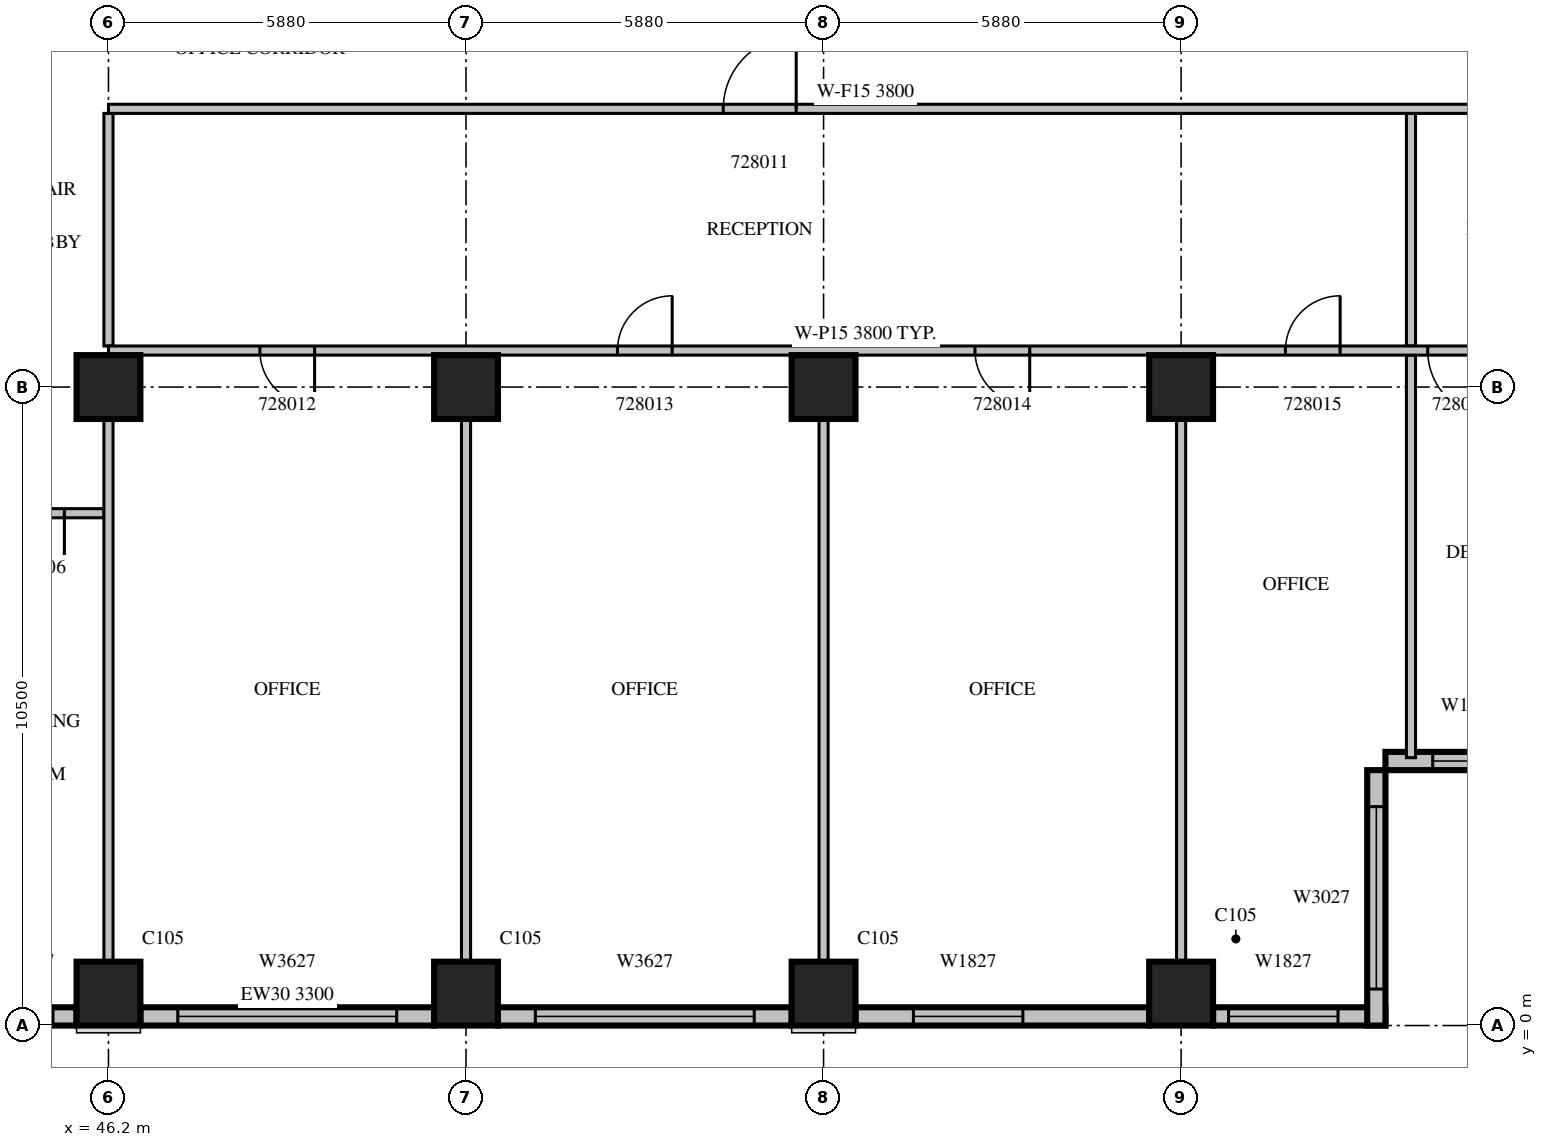
"""IFC4 building model, lengths in metres.
Left out: names, types, materials, properties, quantities, classifications, styles, units other than length and angle.
Written with IfcOpenShell. Run it as: python <this file> out.ifc"""

import sys

from ifc_helpers import new_model, si_unit, direction, frame, frame_2d, origin, origin_2d, place, context, subcontext, project, spatial, rectangle, extrude, source, transform, mapped, element, fill, save


model = new_model("IFC4")
c1 = context("Model", 3, precision=1e-05, world=origin(), true_north=direction((0.0, 1.0)))
c2 = subcontext(c1, "Body", "Model", "MODEL_VIEW")
j1 = project(units=[si_unit("LENGTHUNIT", "METRE"), si_unit("PLANEANGLEUNIT", "RADIAN")], contexts=[c1])
p1 = place(None, origin())
s1 = spatial("IfcSite", under=j1, at=p1, CompositionType="ELEMENT")
p2 = place(p1, origin())
s2 = spatial("IfcBuilding", under=s1, at=p2, CompositionType="ELEMENT")
p3 = place(p2, frame((0.0, 0.0, 128.7)))
s3 = spatial("IfcBuildingStorey", under=s2, at=p3, CompositionType="ELEMENT", Elevation=128.7)
m1 = source(origin(), c2, "Body", "SweptSolid", [
    extrude(rectangle(XDim=1.05, YDim=1.05, at=origin_2d()), origin(), (0.0, 0.0, 1.0), 4.2),
])
for number, where, z_axis, x_axis in (
    (1, (46.2, 0.525, 0.0), (0.0, 0.0, 1.0), (1.0, 0.0, 0.0)),
    (2, (52.08, 0.525, 0.0), (0.0, 0.0, 1.0), (1.0, 0.0, 0.0)),
    (3, (57.96, 0.525, 0.0), (0.0, 0.0, 1.0), (1.0, 0.0, 0.0)),
    (4, (63.84, 0.525, 0.0), (0.0, 0.0, 1.0), (1.0, 0.0, 0.0)),
    (5, (46.2, 10.5, 0.0), (0.0, 0.0, 1.0), (1.0, 0.0, 0.0)),
    (6, (52.08, 10.5, 0.0), (0.0, 0.0, 1.0), (1.0, 0.0, 0.0)),
    (7, (57.96, 10.5, 0.0), (0.0, 0.0, 1.0), (1.0, 0.0, 0.0)),
    (8, (63.84, 10.5, 0.0), (0.0, 0.0, 1.0), (1.0, 0.0, 0.0)),
):
    element("IfcColumn", number, at=place(p3, frame(where, z_axis=z_axis, x_axis=x_axis)), inside=s3, PredefinedType="COLUMN", context=c2, shape_type="MappedRepresentation", body=[
        mapped(m1, transform((0.0, 0.0, 0.0), scale=1.0)),
    ])
m2 = source(origin(), c2, "Body", "SweptSolid", [
    extrude(rectangle(XDim=1.675, YDim=0.3, at=frame_2d((0.838, 0.0))), origin(), (0.0, 0.0, 1.0), 3.8),
])
p4 = place(p3, frame((44.0, 0.15, 0.0), z_axis=(0.0, 0.0, 1.0), x_axis=(1.0, 0.0, 0.0)))
e9 = element("IfcWall", 9, at=p4, inside=s3, PredefinedType="STANDARD", context=c2, shape_type="MappedRepresentation", body=[
    mapped(m2, transform((0.0, 0.0, 0.0), scale=1.0)),
])
m3 = source(origin(), c2, "Body", "SweptSolid", [
    extrude(rectangle(XDim=0.9, YDim=2.7, at=frame_2d((0.45, 1.35))), frame((0.0, 0.16, 0.0), z_axis=(0.0, -1.0, 0.0), x_axis=(1.0, 0.0, 0.0)), (0.0, 0.0, 1.0), 0.32),
])
p5 = place(p4, frame((0.388, 0.0, 0.6)))
e10 = element("IfcOpeningElement", 10, at=p5, cuts=e9, PredefinedType="OPENING", context=c2, shape_type="MappedRepresentation", body=[
    mapped(m3, transform((0.0, 0.0, 0.0), scale=1.0)),
])
m4 = source(origin(), c2, "Body", "SweptSolid", [
    extrude(rectangle(XDim=4.83, YDim=0.3, at=frame_2d((2.415, 0.0))), origin(), (0.0, 0.0, 1.0), 3.3),
])
p6 = place(p3, frame((46.725, 0.15, 0.0), z_axis=(0.0, 0.0, 1.0), x_axis=(1.0, 0.0, 0.0)))
e11 = element("IfcWall", 11, at=p6, inside=s3, PredefinedType="STANDARD", context=c2, shape_type="MappedRepresentation", body=[
    mapped(m4, transform((0.0, 0.0, 0.0), scale=1.0)),
])
m5 = source(origin(), c2, "Body", "SweptSolid", [
    extrude(rectangle(XDim=3.6, YDim=2.7, at=frame_2d((1.8, 1.35))), frame((0.0, 0.16, 0.0), z_axis=(0.0, -1.0, 0.0), x_axis=(1.0, 0.0, 0.0)), (0.0, 0.0, 1.0), 0.32),
])
p7 = place(p6, frame((0.615, 0.0, 0.6)))
e12 = element("IfcOpeningElement", 12, at=p7, cuts=e11, PredefinedType="OPENING", context=c2, shape_type="MappedRepresentation", body=[
    mapped(m5, transform((0.0, 0.0, 0.0), scale=1.0)),
])
m6 = source(origin(), c2, "Body", "SweptSolid", [
    extrude(rectangle(XDim=4.83, YDim=0.3, at=frame_2d((2.415, 0.0))), origin(), (0.0, 0.0, 1.0), 3.8),
])
p8 = place(p3, frame((52.605, 0.15, 0.0), z_axis=(0.0, 0.0, 1.0), x_axis=(1.0, 0.0, 0.0)))
e13 = element("IfcWall", 13, at=p8, inside=s3, PredefinedType="STANDARD", context=c2, shape_type="MappedRepresentation", body=[
    mapped(m6, transform((0.0, 0.0, 0.0), scale=1.0)),
])
p9 = place(p8, frame((0.615, 0.0, 0.6)))
e14 = element("IfcOpeningElement", 14, at=p9, cuts=e13, PredefinedType="OPENING", context=c2, shape_type="MappedRepresentation", body=[
    mapped(m5, transform((0.0, 0.0, 0.0), scale=1.0)),
])
p10 = place(p3, frame((58.485, 0.15, 0.0), z_axis=(0.0, 0.0, 1.0), x_axis=(1.0, 0.0, 0.0)))
e15 = element("IfcWall", 15, at=p10, inside=s3, PredefinedType="STANDARD", context=c2, shape_type="MappedRepresentation", body=[
    mapped(m6, transform((0.0, 0.0, 0.0), scale=1.0)),
])
m7 = source(origin(), c2, "Body", "SweptSolid", [
    extrude(rectangle(XDim=1.8, YDim=2.7, at=frame_2d((0.9, 1.35))), frame((0.0, 0.16, 0.0), z_axis=(0.0, -1.0, 0.0), x_axis=(1.0, 0.0, 0.0)), (0.0, 0.0, 1.0), 0.32),
])
p11 = place(p10, frame((0.953, 0.0, 0.6)))
e16 = element("IfcOpeningElement", 16, at=p11, cuts=e15, PredefinedType="OPENING", context=c2, shape_type="MappedRepresentation", body=[
    mapped(m7, transform((0.0, 0.0, 0.0), scale=1.0)),
])
m8 = source(origin(), c2, "Body", "SweptSolid", [
    extrude(rectangle(XDim=2.835, YDim=0.3, at=frame_2d((1.417, 0.0))), origin(), (0.0, 0.0, 1.0), 3.8),
])
p12 = place(p3, frame((64.365, 0.15, 0.0), z_axis=(0.0, 0.0, 1.0), x_axis=(1.0, 0.0, 0.0)))
e17 = element("IfcWall", 17, at=p12, inside=s3, PredefinedType="STANDARD", context=c2, shape_type="MappedRepresentation", body=[
    mapped(m8, transform((0.0, 0.0, 0.0), scale=1.0)),
])
p13 = place(p12, frame((0.255, 0.0, 0.6)))
e18 = element("IfcOpeningElement", 18, at=p13, cuts=e17, PredefinedType="OPENING", context=c2, shape_type="MappedRepresentation", body=[
    mapped(m7, transform((0.0, 0.0, 0.0), scale=1.0)),
])
m9 = source(origin(), c2, "Body", "SweptSolid", [
    extrude(rectangle(XDim=4.2, YDim=0.3, at=frame_2d((2.1, 0.0))), origin(), (0.0, 0.0, 1.0), 3.8),
])
p14 = place(p3, frame((67.05, 0.0, 0.0), z_axis=(0.0, 0.0, 1.0), x_axis=(0.0, 1.0, 0.0)))
e19 = element("IfcWall", 19, at=p14, inside=s3, PredefinedType="STANDARD", context=c2, shape_type="MappedRepresentation", body=[
    mapped(m9, transform((0.0, 0.0, 0.0), scale=1.0)),
])
m10 = source(origin(), c2, "Body", "SweptSolid", [
    extrude(rectangle(XDim=3.0, YDim=2.7, at=frame_2d((1.5, 1.35))), frame((0.0, 0.16, 0.0), z_axis=(0.0, -1.0, 0.0), x_axis=(1.0, 0.0, 0.0)), (0.0, 0.0, 1.0), 0.32),
])
p15 = place(p14, frame((0.6, 0.0, 0.6)))
e20 = element("IfcOpeningElement", 20, at=p15, cuts=e19, PredefinedType="OPENING", context=c2, shape_type="MappedRepresentation", body=[
    mapped(m10, transform((0.0, 0.0, 0.0), scale=1.0)),
])
m11 = source(origin(), c2, "Body", "SweptSolid", [
    extrude(rectangle(XDim=2.52, YDim=0.3, at=frame_2d((1.26, 0.0))), origin(), (0.0, 0.0, 1.0), 3.8),
])
p16 = place(p3, frame((67.2, 4.35, 0.0), z_axis=(0.0, 0.0, 1.0), x_axis=(1.0, 0.0, 0.0)))
e21 = element("IfcWall", 21, at=p16, inside=s3, PredefinedType="STANDARD", context=c2, shape_type="MappedRepresentation", body=[
    mapped(m11, transform((0.0, 0.0, 0.0), scale=1.0)),
])
m12 = source(origin(), c2, "Body", "SweptSolid", [
    extrude(rectangle(XDim=1.2, YDim=2.7, at=frame_2d((0.6, 1.35))), frame((0.0, 0.16, 0.0), z_axis=(0.0, -1.0, 0.0), x_axis=(1.0, 0.0, 0.0)), (0.0, 0.0, 1.0), 0.32),
])
p17 = place(p16, frame((0.777, 0.0, 0.6)))
e22 = element("IfcOpeningElement", 22, at=p17, cuts=e21, PredefinedType="OPENING", context=c2, shape_type="MappedRepresentation", body=[
    mapped(m12, transform((0.0, 0.0, 0.0), scale=1.0)),
])
m13 = source(origin(), c2, "Body", "SweptSolid", [
    extrude(rectangle(XDim=2.2, YDim=0.15, at=frame_2d((1.1, 0.0))), origin(), (0.0, 0.0, 1.0), 3.8),
])
p18 = place(p3, frame((46.125, 8.425, 0.0), z_axis=(0.0, 0.0, 1.0), x_axis=(-1.0, 0.0, 0.0)))
e23 = element("IfcWall", 23, at=p18, inside=s3, PredefinedType="PARTITIONING", context=c2, shape_type="MappedRepresentation", body=[
    mapped(m13, transform((0.0, 0.0, 0.0), scale=1.0)),
])
m14 = source(origin(), c2, "Body", "SweptSolid", [
    extrude(rectangle(XDim=0.9, YDim=2.1, at=frame_2d((0.45, 1.05))), frame((0.0, 0.085, 0.0), z_axis=(0.0, -1.0, 0.0), x_axis=(1.0, 0.0, 0.0)), (0.0, 0.0, 1.0), 0.17),
])
p19 = place(p18, frame((0.65, 0.0, 0.0)))
e24 = element("IfcOpeningElement", 24, at=p19, cuts=e23, PredefinedType="OPENING", context=c2, shape_type="MappedRepresentation", body=[
    mapped(m14, transform((0.0, 0.0, 0.0), scale=1.0)),
])
m15 = source(origin(), c2, "Body", "SweptSolid", [
    extrude(rectangle(XDim=8.927, YDim=0.15, at=frame_2d((4.463, 0.0))), origin(), (0.0, 0.0, 1.0), 3.8),
])
for number, where, z_axis, x_axis in (
    (25, (52.08, 1.049, 0.0), (0.0, 0.0, 1.0), (0.0, 1.0, 0.0)),
    (26, (57.96, 1.049, 0.0), (0.0, 0.0, 1.0), (0.0, 1.0, 0.0)),
    (27, (63.84, 1.049, 0.0), (0.0, 0.0, 1.0), (0.0, 1.0, 0.0)),
    (28, (46.2, 1.049, 0.0), (0.0, 0.0, 1.0), (0.0, 1.0, 0.0)),
):
    element("IfcWall", number, at=place(p3, frame(where, z_axis=z_axis, x_axis=x_axis)), inside=s3, PredefinedType="PARTITIONING", context=c2, shape_type="MappedRepresentation", body=[
        mapped(m15, transform((0.0, 0.0, 0.0), scale=1.0)),
    ])
m16 = source(origin(), c2, "Body", "SweptSolid", [
    extrude(rectangle(XDim=3.825, YDim=0.15, at=frame_2d((1.913, 0.0))), origin(), (0.0, 0.0, 1.0), 3.8),
])
p20 = place(p3, frame((46.2, 11.175, 0.0), z_axis=(0.0, 0.0, 1.0), x_axis=(0.0, 1.0, 0.0)))
e29 = element("IfcWall", 29, at=p20, inside=s3, PredefinedType="PARTITIONING", context=c2, shape_type="MappedRepresentation", body=[
    mapped(m16, transform((0.0, 0.0, 0.0), scale=1.0)),
])
m17 = source(origin(), c2, "Body", "SweptSolid", [
    extrude(rectangle(XDim=6.62, YDim=0.15, at=frame_2d((3.31, 0.0))), origin(), (0.0, 0.0, 1.0), 3.8),
])
p21 = place(p3, frame((67.62, 4.405, 0.0), z_axis=(0.0, 0.0, 1.0), x_axis=(0.0, 1.0, 0.0)))
e30 = element("IfcWall", 30, at=p21, inside=s3, PredefinedType="PARTITIONING", context=c2, shape_type="MappedRepresentation", body=[
    mapped(m17, transform((0.0, 0.0, 0.0), scale=1.0)),
])
p22 = place(p3, frame((67.62, 11.175, 0.0), z_axis=(0.0, 0.0, 1.0), x_axis=(0.0, 1.0, 0.0)))
e31 = element("IfcWall", 31, at=p22, inside=s3, PredefinedType="PARTITIONING", context=c2, shape_type="MappedRepresentation", body=[
    mapped(m16, transform((0.0, 0.0, 0.0), scale=1.0)),
])
m18 = source(origin(), c2, "Body", "SweptSolid", [
    extrude(rectangle(XDim=24.9, YDim=0.15, at=frame_2d((12.45, 0.0))), origin(), (0.0, 0.0, 1.0), 3.8),
])
p23 = place(p3, frame((71.1, 11.1, 0.0), z_axis=(0.0, 0.0, 1.0), x_axis=(-1.0, 0.0, 0.0)))
e32 = element("IfcWall", 32, at=p23, inside=s3, PredefinedType="PARTITIONING", context=c2, shape_type="MappedRepresentation", body=[
    mapped(m18, transform((0.0, 0.0, 0.0), scale=1.0)),
])
p24 = place(p23, frame((21.51, 0.0, 0.0)))
e33 = element("IfcOpeningElement", 33, at=p24, cuts=e32, PredefinedType="OPENING", context=c2, shape_type="MappedRepresentation", body=[
    mapped(m14, transform((0.0, 0.0, 0.0), scale=1.0)),
])
p25 = place(p23, frame((15.63, 0.0, 0.0)))
e34 = element("IfcOpeningElement", 34, at=p25, cuts=e32, PredefinedType="OPENING", context=c2, shape_type="MappedRepresentation", body=[
    mapped(m14, transform((0.0, 0.0, 0.0), scale=1.0)),
])
p26 = place(p23, frame((9.75, 0.0, 0.0)))
e35 = element("IfcOpeningElement", 35, at=p26, cuts=e32, PredefinedType="OPENING", context=c2, shape_type="MappedRepresentation", body=[
    mapped(m14, transform((0.0, 0.0, 0.0), scale=1.0)),
])
p27 = place(p23, frame((4.645, 0.0, 0.0)))
e36 = element("IfcOpeningElement", 36, at=p27, cuts=e32, PredefinedType="OPENING", context=c2, shape_type="MappedRepresentation", body=[
    mapped(m14, transform((0.0, 0.0, 0.0), scale=1.0)),
])
m19 = source(origin(), c2, "Body", "SweptSolid", [
    extrude(rectangle(XDim=1.1, YDim=2.1, at=frame_2d((0.55, 1.05))), frame((0.0, 0.085, 0.0), z_axis=(0.0, -1.0, 0.0), x_axis=(1.0, 0.0, 0.0)), (0.0, 0.0, 1.0), 0.17),
])
p28 = place(p23, frame((2.105, 0.0, 0.0)))
e37 = element("IfcOpeningElement", 37, at=p28, cuts=e32, PredefinedType="OPENING", context=c2, shape_type="MappedRepresentation", body=[
    mapped(m19, transform((0.0, 0.0, 0.0), scale=1.0)),
])
p29 = place(p3, frame((71.1, 15.075, 0.0), z_axis=(0.0, 0.0, 1.0), x_axis=(-1.0, 0.0, 0.0)))
e38 = element("IfcWall", 38, at=p29, inside=s3, PredefinedType="PARTITIONING", context=c2, shape_type="MappedRepresentation", body=[
    mapped(m18, transform((0.0, 0.0, 0.0), scale=1.0)),
])
m20 = source(origin(), c2, "Body", "SweptSolid", [
    extrude(rectangle(XDim=1.2, YDim=2.1, at=frame_2d((0.6, 1.05))), frame((0.0, 0.085, 0.0), z_axis=(0.0, -1.0, 0.0), x_axis=(1.0, 0.0, 0.0)), (0.0, 0.0, 1.0), 0.17),
])
p30 = place(p29, frame((13.59, 0.0, 0.0)))
e39 = element("IfcOpeningElement", 39, at=p30, cuts=e38, PredefinedType="OPENING", context=c2, shape_type="MappedRepresentation", body=[
    mapped(m20, transform((0.0, 0.0, 0.0), scale=1.0)),
])
p31 = place(p29, frame((1.153, 0.0, 0.0)))
e40 = element("IfcOpeningElement", 40, at=p31, cuts=e38, PredefinedType="OPENING", context=c2, shape_type="MappedRepresentation", body=[
    mapped(m19, transform((0.0, 0.0, 0.0), scale=1.0)),
])
m21 = source(origin(), c2, "Body", "SweptSolid", [
    extrude(rectangle(XDim=0.9, YDim=2.7, at=frame_2d((0.45, 1.35))), frame((0.0, 0.03, 0.0), z_axis=(0.0, -1.0, 0.0), x_axis=(1.0, 0.0, 0.0)), (0.0, 0.0, 1.0), 0.06),
])
p32 = place(p5, origin())
e41 = element("IfcWindow", 41, at=p32, inside=s3, PartitioningType="SINGLE_PANEL", PredefinedType="WINDOW", context=c2, shape_type="MappedRepresentation", body=[
    mapped(m21, transform((0.0, 0.0, 0.0), scale=1.0)),
])
fill(e10, e41)
m22 = source(origin(), c2, "Body", "SweptSolid", [
    extrude(rectangle(XDim=3.6, YDim=2.7, at=frame_2d((1.8, 1.35))), frame((0.0, 0.03, 0.0), z_axis=(0.0, -1.0, 0.0), x_axis=(1.0, 0.0, 0.0)), (0.0, 0.0, 1.0), 0.06),
])
p33 = place(p7, origin())
e42 = element("IfcWindow", 42, at=p33, inside=s3, PartitioningType="SINGLE_PANEL", PredefinedType="WINDOW", context=c2, shape_type="MappedRepresentation", body=[
    mapped(m22, transform((0.0, 0.0, 0.0), scale=1.0)),
])
fill(e12, e42)
p34 = place(p9, origin())
e43 = element("IfcWindow", 43, at=p34, inside=s3, PartitioningType="SINGLE_PANEL", PredefinedType="WINDOW", context=c2, shape_type="MappedRepresentation", body=[
    mapped(m22, transform((0.0, 0.0, 0.0), scale=1.0)),
])
fill(e14, e43)
m23 = source(origin(), c2, "Body", "SweptSolid", [
    extrude(rectangle(XDim=1.8, YDim=2.7, at=frame_2d((0.9, 1.35))), frame((0.0, 0.03, 0.0), z_axis=(0.0, -1.0, 0.0), x_axis=(1.0, 0.0, 0.0)), (0.0, 0.0, 1.0), 0.06),
])
p35 = place(p11, origin())
e44 = element("IfcWindow", 44, at=p35, inside=s3, PartitioningType="SINGLE_PANEL", PredefinedType="WINDOW", context=c2, shape_type="MappedRepresentation", body=[
    mapped(m23, transform((0.0, 0.0, 0.0), scale=1.0)),
])
fill(e16, e44)
p36 = place(p13, origin())
e45 = element("IfcWindow", 45, at=p36, inside=s3, PartitioningType="SINGLE_PANEL", PredefinedType="WINDOW", context=c2, shape_type="MappedRepresentation", body=[
    mapped(m23, transform((0.0, 0.0, 0.0), scale=1.0)),
])
fill(e18, e45)
m24 = source(origin(), c2, "Body", "SweptSolid", [
    extrude(rectangle(XDim=3.0, YDim=2.7, at=frame_2d((1.5, 1.35))), frame((0.0, 0.03, 0.0), z_axis=(0.0, -1.0, 0.0), x_axis=(1.0, 0.0, 0.0)), (0.0, 0.0, 1.0), 0.06),
])
p37 = place(p15, origin())
e46 = element("IfcWindow", 46, at=p37, inside=s3, PartitioningType="SINGLE_PANEL", PredefinedType="WINDOW", context=c2, shape_type="MappedRepresentation", body=[
    mapped(m24, transform((0.0, 0.0, 0.0), scale=1.0)),
])
fill(e20, e46)
m25 = source(origin(), c2, "Body", "SweptSolid", [
    extrude(rectangle(XDim=1.2, YDim=2.7, at=frame_2d((0.6, 1.35))), frame((0.0, 0.03, 0.0), z_axis=(0.0, -1.0, 0.0), x_axis=(1.0, 0.0, 0.0)), (0.0, 0.0, 1.0), 0.06),
])
p38 = place(p17, origin())
e47 = element("IfcWindow", 47, at=p38, inside=s3, PartitioningType="SINGLE_PANEL", PredefinedType="WINDOW", context=c2, shape_type="MappedRepresentation", body=[
    mapped(m25, transform((0.0, 0.0, 0.0), scale=1.0)),
])
fill(e22, e47)
m26 = source(origin(), c2, "Body", "SweptSolid", [
    extrude(rectangle(XDim=0.9, YDim=2.1, at=frame_2d((0.45, 1.05))), frame((0.0, 0.025, 0.0), z_axis=(0.0, -1.0, 0.0), x_axis=(1.0, 0.0, 0.0)), (0.0, 0.0, 1.0), 0.05),
])
p39 = place(p19, origin())
e48 = element("IfcDoor", 48, at=p39, inside=s3, OperationType="SINGLE_SWING_LEFT", PredefinedType="DOOR", context=c2, shape_type="MappedRepresentation", body=[
    mapped(m26, transform((0.0, 0.0, 0.0), scale=1.0)),
])
fill(e24, e48)
m27 = source(origin(), c2, "Body", "SweptSolid", [
    extrude(rectangle(XDim=1.2, YDim=2.1, at=frame_2d((0.6, 1.05))), frame((0.0, 0.025, 0.0), z_axis=(0.0, -1.0, 0.0), x_axis=(1.0, 0.0, 0.0)), (0.0, 0.0, 1.0), 0.05),
])
p40 = place(p30, origin())
e49 = element("IfcDoor", 49, at=p40, inside=s3, OperationType="SINGLE_SWING_RIGHT", PredefinedType="DOOR", context=c2, shape_type="MappedRepresentation", body=[
    mapped(m27, transform((0.0, 0.0, 0.0), scale=1.0)),
])
fill(e39, e49)
p41 = place(p24, origin())
e50 = element("IfcDoor", 50, at=p41, inside=s3, OperationType="SINGLE_SWING_LEFT", PredefinedType="DOOR", context=c2, shape_type="MappedRepresentation", body=[
    mapped(m26, transform((0.0, 0.0, 0.0), scale=1.0)),
])
fill(e33, e50)
p42 = place(p25, origin())
e51 = element("IfcDoor", 51, at=p42, inside=s3, OperationType="SINGLE_SWING_RIGHT", PredefinedType="DOOR", context=c2, shape_type="MappedRepresentation", body=[
    mapped(m26, transform((0.0, 0.0, 0.0), scale=1.0)),
])
fill(e34, e51)
p43 = place(p26, origin())
e52 = element("IfcDoor", 52, at=p43, inside=s3, OperationType="SINGLE_SWING_LEFT", PredefinedType="DOOR", context=c2, shape_type="MappedRepresentation", body=[
    mapped(m26, transform((0.0, 0.0, 0.0), scale=1.0)),
])
fill(e35, e52)
p44 = place(p27, origin())
e53 = element("IfcDoor", 53, at=p44, inside=s3, OperationType="SINGLE_SWING_RIGHT", PredefinedType="DOOR", context=c2, shape_type="MappedRepresentation", body=[
    mapped(m26, transform((0.0, 0.0, 0.0), scale=1.0)),
])
fill(e36, e53)
m28 = source(origin(), c2, "Body", "SweptSolid", [
    extrude(rectangle(XDim=1.1, YDim=2.1, at=frame_2d((0.55, 1.05))), frame((0.0, 0.025, 0.0), z_axis=(0.0, -1.0, 0.0), x_axis=(1.0, 0.0, 0.0)), (0.0, 0.0, 1.0), 0.05),
])
p45 = place(p28, origin())
e54 = element("IfcDoor", 54, at=p45, inside=s3, OperationType="SINGLE_SWING_LEFT", PredefinedType="DOOR", context=c2, shape_type="MappedRepresentation", body=[
    mapped(m28, transform((0.0, 0.0, 0.0), scale=1.0)),
])
fill(e37, e54)
save(model, sys.argv[1])
